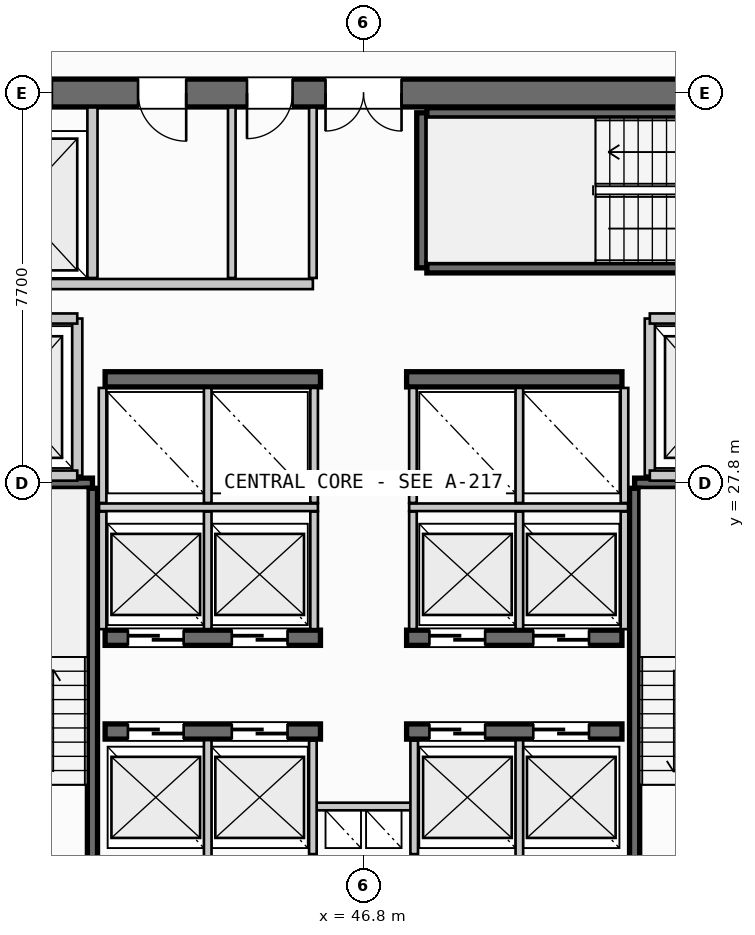
"""IFC4 building model, lengths in metres.
Left out: names, types, materials, properties, quantities, classifications, styles, units other than length and angle.
Written with IfcOpenShell. Run it as: python <this file> out.ifc"""

import sys

from ifc_helpers import new_model, si_unit, direction, frame, frame_2d, origin, place, context, subcontext, project, spatial, rectangle, extrude, source, transform, mapped, element, fill, save


model = new_model("IFC4")
c1 = context("Model", 3, precision=1e-05, world=origin(), true_north=direction((0.0, 1.0)))
c2 = subcontext(c1, "Body", "Model", "MODEL_VIEW")
j1 = project(units=[si_unit("LENGTHUNIT", "METRE"), si_unit("PLANEANGLEUNIT", "RADIAN")], contexts=[c1])
p1 = place(None, origin())
s1 = spatial("IfcSite", under=j1, at=p1, CompositionType="ELEMENT")
p2 = place(p1, origin())
s2 = spatial("IfcBuilding", under=s1, at=p2, CompositionType="ELEMENT")
p3 = place(p2, frame((0.0, 0.0, 125.2)))
s3 = spatial("IfcBuildingStorey", under=s2, at=p3, CompositionType="ELEMENT", Elevation=125.2)
p4 = place(p3, frame((55.6, 35.5, 0.0), z_axis=(0.0, 0.0, 1.0), x_axis=(-1.0, 0.0, 0.0)))
e1 = element("IfcWall", 1, at=p4, inside=s3, PredefinedType="SHEAR", context=c2, shape_type="SweptSolid", body=[
    extrude(rectangle(XDim=17.6, YDim=0.55, at=frame_2d((8.8, 0.0))), origin(), (0.0, 0.0, 1.0), 3.35),
])
p5 = place(p4, frame((8.05, 0.0, 0.0)))
e2 = element("IfcOpeningElement", 2, at=p5, cuts=e1, PredefinedType="OPENING", context=c2, shape_type="SweptSolid", body=[
    extrude(rectangle(XDim=1.5, YDim=2.2, at=frame_2d((0.75, 1.1))), frame((0.0, 0.285, 0.0), z_axis=(0.0, -1.0, 0.0), x_axis=(1.0, 0.0, 0.0)), (0.0, 0.0, 1.0), 0.57),
])
p6 = place(p4, frame((14.95, 0.0, 0.0)))
e3 = element("IfcOpeningElement", 3, at=p6, cuts=e1, PredefinedType="OPENING", context=c2, shape_type="SweptSolid", body=[
    extrude(rectangle(XDim=1.4, YDim=2.3, at=frame_2d((0.7, 1.15))), frame((0.0, 0.285, 0.0), z_axis=(0.0, -1.0, 0.0), x_axis=(1.0, 0.0, 0.0)), (0.0, 0.0, 1.0), 0.57),
])
p7 = place(p4, frame((12.3, 0.0, 0.0)))
e4 = element("IfcOpeningElement", 4, at=p7, cuts=e1, PredefinedType="OPENING", context=c2, shape_type="SweptSolid", body=[
    extrude(rectangle(XDim=0.95, YDim=2.15, at=frame_2d((0.475, 1.075))), frame((0.0, 0.285, 0.0), z_axis=(0.0, -1.0, 0.0), x_axis=(1.0, 0.0, 0.0)), (0.0, 0.0, 1.0), 0.57),
])
p8 = place(p4, frame((10.2, 0.0, 0.0)))
e5 = element("IfcOpeningElement", 5, at=p8, cuts=e1, PredefinedType="OPENING", context=c2, shape_type="SweptSolid", body=[
    extrude(rectangle(XDim=0.9, YDim=2.15, at=frame_2d((0.45, 1.075))), frame((0.0, 0.285, 0.0), z_axis=(0.0, -1.0, 0.0), x_axis=(1.0, 0.0, 0.0)), (0.0, 0.0, 1.0), 0.57),
])
p9 = place(p3, frame((41.7, 22.9, 0.0), z_axis=(0.0, 0.0, 1.0), x_axis=(1.0, 0.0, 0.0)))
e6 = element("IfcWall", 6, at=p9, inside=s3, PredefinedType="SHEAR", context=c2, shape_type="SweptSolid", body=[
    extrude(rectangle(XDim=4.25, YDim=0.3, at=frame_2d((2.125, 0.0))), origin(), (0.0, 0.0, 1.0), 3.35),
])
p10 = place(p9, frame((0.45, 0.0, 0.0)))
e7 = element("IfcOpeningElement", 7, at=p10, cuts=e6, PredefinedType="OPENING", context=c2, shape_type="SweptSolid", body=[
    extrude(rectangle(XDim=1.1, YDim=2.2, at=frame_2d((0.55, 1.1))), frame((0.0, 0.16, 0.0), z_axis=(0.0, -1.0, 0.0), x_axis=(1.0, 0.0, 0.0)), (0.0, 0.0, 1.0), 0.32),
])
p11 = place(p9, frame((2.5, 0.0, 0.0)))
e8 = element("IfcOpeningElement", 8, at=p11, cuts=e6, PredefinedType="OPENING", context=c2, shape_type="SweptSolid", body=[
    extrude(rectangle(XDim=1.1, YDim=2.2, at=frame_2d((0.55, 1.1))), frame((0.0, 0.16, 0.0), z_axis=(0.0, -1.0, 0.0), x_axis=(1.0, 0.0, 0.0)), (0.0, 0.0, 1.0), 0.32),
])
p12 = place(p3, frame((47.65, 22.9, 0.0), z_axis=(0.0, 0.0, 1.0), x_axis=(1.0, 0.0, 0.0)))
e9 = element("IfcWall", 9, at=p12, inside=s3, PredefinedType="SHEAR", context=c2, shape_type="SweptSolid", body=[
    extrude(rectangle(XDim=4.25, YDim=0.3, at=frame_2d((2.125, 0.0))), origin(), (0.0, 0.0, 1.0), 3.35),
])
p13 = place(p12, frame((0.45, 0.0, 0.0)))
e10 = element("IfcOpeningElement", 10, at=p13, cuts=e9, PredefinedType="OPENING", context=c2, shape_type="SweptSolid", body=[
    extrude(rectangle(XDim=1.1, YDim=2.2, at=frame_2d((0.55, 1.1))), frame((0.0, 0.16, 0.0), z_axis=(0.0, -1.0, 0.0), x_axis=(1.0, 0.0, 0.0)), (0.0, 0.0, 1.0), 0.32),
])
p14 = place(p12, frame((2.5, 0.0, 0.0)))
e11 = element("IfcOpeningElement", 11, at=p14, cuts=e9, PredefinedType="OPENING", context=c2, shape_type="SweptSolid", body=[
    extrude(rectangle(XDim=1.1, YDim=2.2, at=frame_2d((0.55, 1.1))), frame((0.0, 0.16, 0.0), z_axis=(0.0, -1.0, 0.0), x_axis=(1.0, 0.0, 0.0)), (0.0, 0.0, 1.0), 0.32),
])
p15 = place(p3, frame((41.7, 24.75, 0.0), z_axis=(0.0, 0.0, 1.0), x_axis=(1.0, 0.0, 0.0)))
e12 = element("IfcWall", 12, at=p15, inside=s3, PredefinedType="SHEAR", context=c2, shape_type="SweptSolid", body=[
    extrude(rectangle(XDim=4.25, YDim=0.3, at=frame_2d((2.125, 0.0))), origin(), (0.0, 0.0, 1.0), 3.35),
])
p16 = place(p15, frame((0.45, 0.0, 0.0)))
e13 = element("IfcOpeningElement", 13, at=p16, cuts=e12, PredefinedType="OPENING", context=c2, shape_type="SweptSolid", body=[
    extrude(rectangle(XDim=1.1, YDim=2.2, at=frame_2d((0.55, 1.1))), frame((0.0, 0.16, 0.0), z_axis=(0.0, -1.0, 0.0), x_axis=(1.0, 0.0, 0.0)), (0.0, 0.0, 1.0), 0.32),
])
p17 = place(p15, frame((2.5, 0.0, 0.0)))
e14 = element("IfcOpeningElement", 14, at=p17, cuts=e12, PredefinedType="OPENING", context=c2, shape_type="SweptSolid", body=[
    extrude(rectangle(XDim=1.1, YDim=2.2, at=frame_2d((0.55, 1.1))), frame((0.0, 0.16, 0.0), z_axis=(0.0, -1.0, 0.0), x_axis=(1.0, 0.0, 0.0)), (0.0, 0.0, 1.0), 0.32),
])
p18 = place(p3, frame((47.65, 24.75, 0.0), z_axis=(0.0, 0.0, 1.0), x_axis=(1.0, 0.0, 0.0)))
e15 = element("IfcWall", 15, at=p18, inside=s3, PredefinedType="SHEAR", context=c2, shape_type="SweptSolid", body=[
    extrude(rectangle(XDim=4.25, YDim=0.3, at=frame_2d((2.125, 0.0))), origin(), (0.0, 0.0, 1.0), 3.35),
])
p19 = place(p18, frame((0.45, 0.0, 0.0)))
e16 = element("IfcOpeningElement", 16, at=p19, cuts=e15, PredefinedType="OPENING", context=c2, shape_type="SweptSolid", body=[
    extrude(rectangle(XDim=1.1, YDim=2.2, at=frame_2d((0.55, 1.1))), frame((0.0, 0.16, 0.0), z_axis=(0.0, -1.0, 0.0), x_axis=(1.0, 0.0, 0.0)), (0.0, 0.0, 1.0), 0.32),
])
p20 = place(p18, frame((2.5, 0.0, 0.0)))
e17 = element("IfcOpeningElement", 17, at=p20, cuts=e15, PredefinedType="OPENING", context=c2, shape_type="SweptSolid", body=[
    extrude(rectangle(XDim=1.1, YDim=2.2, at=frame_2d((0.55, 1.1))), frame((0.0, 0.16, 0.0), z_axis=(0.0, -1.0, 0.0), x_axis=(1.0, 0.0, 0.0)), (0.0, 0.0, 1.0), 0.32),
])
for number, where, z_axis, x_axis in (
    (18, (41.7, 29.85, 0.0), (0.0, 0.0, 1.0), (1.0, 0.0, 0.0)),
    (19, (47.65, 29.85, 0.0), (0.0, 0.0, 1.0), (1.0, 0.0, 0.0)),
):
    element("IfcWall", number, at=place(p3, frame(where, z_axis=z_axis, x_axis=x_axis)), inside=s3, PredefinedType="SHEAR", context=c2, shape_type="SweptSolid", body=[
        extrude(rectangle(XDim=4.25, YDim=0.3, at=frame_2d((2.125, 0.0))), origin(), (0.0, 0.0, 1.0), 3.35),
    ])
p21 = place(p3, frame((38.39, 27.8, 0.0), z_axis=(0.0, 0.0, 1.0), x_axis=(1.0, 0.0, 0.0)))
e20 = element("IfcWall", 20, at=p21, inside=s3, PredefinedType="SHEAR", context=c2, shape_type="SweptSolid", body=[
    extrude(rectangle(XDim=3.06, YDim=0.2, at=frame_2d((1.53, 0.0))), origin(), (0.0, 0.0, 1.0), 3.35),
])
p22 = place(p3, frame((41.45, 27.7, 0.0), z_axis=(0.0, 0.0, 1.0), x_axis=(0.0, -1.0, 0.0)))
e21 = element("IfcWall", 21, at=p22, inside=s3, PredefinedType="SHEAR", context=c2, shape_type="SweptSolid", body=[
    extrude(rectangle(XDim=7.35, YDim=0.2, at=frame_2d((3.675, 0.0))), origin(), (0.0, 0.0, 1.0), 3.35),
])
p23 = place(p3, frame((52.15, 27.8, 0.0), z_axis=(0.0, 0.0, 1.0), x_axis=(1.0, 0.0, 0.0)))
e22 = element("IfcWall", 22, at=p23, inside=s3, PredefinedType="SHEAR", context=c2, shape_type="SweptSolid", body=[
    extrude(rectangle(XDim=3.06, YDim=0.2, at=frame_2d((1.53, 0.0))), origin(), (0.0, 0.0, 1.0), 3.35),
])
p24 = place(p3, frame((52.15, 20.35, 0.0), z_axis=(0.0, 0.0, 1.0), x_axis=(0.0, 1.0, 0.0)))
e23 = element("IfcWall", 23, at=p24, inside=s3, PredefinedType="SHEAR", context=c2, shape_type="SweptSolid", body=[
    extrude(rectangle(XDim=7.35, YDim=0.2, at=frame_2d((3.675, 0.0))), origin(), (0.0, 0.0, 1.0), 3.35),
])
p25 = place(p3, frame((47.95, 32.05, 0.0), z_axis=(0.0, 0.0, 1.0), x_axis=(0.0, 1.0, 0.0)))
e24 = element("IfcWall", 24, at=p25, inside=s3, PredefinedType="SHEAR", context=c2, shape_type="SweptSolid", body=[
    extrude(rectangle(XDim=3.06, YDim=0.2, at=frame_2d((1.53, 0.0))), origin(), (0.0, 0.0, 1.0), 3.35),
])
for number, where, z_axis, x_axis in (
    (25, (48.05, 35.11, 0.0), (0.0, 0.0, 1.0), (1.0, 0.0, 0.0)),
    (26, (55.4, 32.05, 0.0), (0.0, 0.0, 1.0), (-1.0, 0.0, 0.0)),
):
    element("IfcWall", number, at=place(p3, frame(where, z_axis=z_axis, x_axis=x_axis)), inside=s3, PredefinedType="SHEAR", context=c2, shape_type="SweptSolid", body=[
        extrude(rectangle(XDim=7.35, YDim=0.2, at=frame_2d((3.675, 0.0))), origin(), (0.0, 0.0, 1.0), 3.35),
    ])
p26 = place(p3, frame((45.8, 21.42, 0.0), z_axis=(0.0, 0.0, 1.0), x_axis=(1.0, 0.0, 0.0)))
e27 = element("IfcWall", 27, at=p26, inside=s3, PredefinedType="PARTITIONING", context=c2, shape_type="SweptSolid", body=[
    extrude(rectangle(XDim=2.0, YDim=0.15, at=frame_2d((1.0, 0.0))), origin(), (0.0, 0.0, 1.0), 2.635),
])
for number, where, z_axis, x_axis in (
    (28, (45.8, 20.48, 0.0), (0.0, 0.0, 1.0), (0.0, 1.0, 0.0)),
    (29, (47.8, 20.48, 0.0), (0.0, 0.0, 1.0), (0.0, 1.0, 0.0)),
):
    element("IfcWall", number, at=place(p3, frame(where, z_axis=z_axis, x_axis=x_axis)), inside=s3, PredefinedType="PARTITIONING", context=c2, shape_type="SweptSolid", body=[
        extrude(rectangle(XDim=2.24, YDim=0.15, at=frame_2d((1.12, 0.0))), origin(), (0.0, 0.0, 1.0), 2.635),
    ])
p27 = place(p3, frame((41.15, 27.95, 0.0), z_axis=(0.0, 0.0, 1.0), x_axis=(0.0, 1.0, 0.0)))
e30 = element("IfcWall", 30, at=p27, inside=s3, PredefinedType="PARTITIONING", context=c2, shape_type="SweptSolid", body=[
    extrude(rectangle(XDim=3.1, YDim=0.2, at=frame_2d((1.55, 0.0))), origin(), (0.0, 0.0, 1.0), 2.635),
])
for number, where, z_axis, x_axis in (
    (31, (38.285, 27.95, 0.0), (0.0, 0.0, 1.0), (1.0, 0.0, 0.0)),
    (32, (38.285, 31.05, 0.0), (0.0, 0.0, 1.0), (1.0, 0.0, 0.0)),
):
    element("IfcWall", number, at=place(p3, frame(where, z_axis=z_axis, x_axis=x_axis)), inside=s3, PredefinedType="PARTITIONING", context=c2, shape_type="SweptSolid", body=[
        extrude(rectangle(XDim=2.865, YDim=0.2, at=frame_2d((1.433, 0.0))), origin(), (0.0, 0.0, 1.0), 2.635),
    ])
p28 = place(p3, frame((52.45, 27.95, 0.0), z_axis=(0.0, 0.0, 1.0), x_axis=(0.0, 1.0, 0.0)))
e33 = element("IfcWall", 33, at=p28, inside=s3, PredefinedType="PARTITIONING", context=c2, shape_type="SweptSolid", body=[
    extrude(rectangle(XDim=3.1, YDim=0.2, at=frame_2d((1.55, 0.0))), origin(), (0.0, 0.0, 1.0), 2.635),
])
for number, where, z_axis, x_axis in (
    (34, (52.45, 27.95, 0.0), (0.0, 0.0, 1.0), (1.0, 0.0, 0.0)),
    (35, (52.45, 31.05, 0.0), (0.0, 0.0, 1.0), (1.0, 0.0, 0.0)),
):
    element("IfcWall", number, at=place(p3, frame(where, z_axis=z_axis, x_axis=x_axis)), inside=s3, PredefinedType="PARTITIONING", context=c2, shape_type="SweptSolid", body=[
        extrude(rectangle(XDim=2.865, YDim=0.2, at=frame_2d((1.433, 0.0))), origin(), (0.0, 0.0, 1.0), 2.635),
    ])
for number, where, z_axis, x_axis in (
    (36, (43.725, 20.385, 0.0), (0.0, 0.0, 1.0), (0.0, 1.0, 0.0)),
    (37, (49.875, 20.385, 0.0), (0.0, 0.0, 1.0), (0.0, 1.0, 0.0)),
):
    element("IfcWall", number, at=place(p3, frame(where, z_axis=z_axis, x_axis=x_axis)), inside=s3, PredefinedType="PARTITIONING", context=c2, shape_type="SweptSolid", body=[
        extrude(rectangle(XDim=2.345, YDim=0.15, at=frame_2d((1.172, 0.0))), origin(), (0.0, 0.0, 1.0), 2.635),
    ])
p29 = place(p3, frame((41.58, 27.325, 0.0), z_axis=(0.0, 0.0, 1.0), x_axis=(1.0, 0.0, 0.0)))
e38 = element("IfcWall", 38, at=p29, inside=s3, PredefinedType="PARTITIONING", context=c2, shape_type="SweptSolid", body=[
    extrude(rectangle(XDim=4.32, YDim=0.15, at=frame_2d((2.16, 0.0))), origin(), (0.0, 0.0, 1.0), 2.635),
])
p30 = place(p3, frame((47.7, 27.325, 0.0), z_axis=(0.0, 0.0, 1.0), x_axis=(1.0, 0.0, 0.0)))
e39 = element("IfcWall", 39, at=p30, inside=s3, PredefinedType="PARTITIONING", context=c2, shape_type="SweptSolid", body=[
    extrude(rectangle(XDim=4.32, YDim=0.15, at=frame_2d((2.16, 0.0))), origin(), (0.0, 0.0, 1.0), 2.635),
])
for number, where, z_axis, x_axis in (
    (40, (41.65, 24.92, 0.0), (0.0, 0.0, 1.0), (0.0, 1.0, 0.0)),
    (41, (43.725, 24.92, 0.0), (0.0, 0.0, 1.0), (0.0, 1.0, 0.0)),
    (42, (45.825, 24.92, 0.0), (0.0, 0.0, 1.0), (0.0, 1.0, 0.0)),
    (43, (47.775, 24.92, 0.0), (0.0, 0.0, 1.0), (0.0, 1.0, 0.0)),
    (44, (49.875, 24.92, 0.0), (0.0, 0.0, 1.0), (0.0, 1.0, 0.0)),
    (45, (51.95, 24.92, 0.0), (0.0, 0.0, 1.0), (0.0, 1.0, 0.0)),
):
    element("IfcWall", number, at=place(p3, frame(where, z_axis=z_axis, x_axis=x_axis)), inside=s3, PredefinedType="PARTITIONING", context=c2, shape_type="SweptSolid", body=[
        extrude(rectangle(XDim=2.32, YDim=0.15, at=frame_2d((1.16, 0.0))), origin(), (0.0, 0.0, 1.0), 2.635),
    ])
for number, where, z_axis, x_axis in (
    (46, (41.65, 27.41, 0.0), (0.0, 0.0, 1.0), (0.0, 1.0, 0.0)),
    (47, (43.725, 27.41, 0.0), (0.0, 0.0, 1.0), (0.0, 1.0, 0.0)),
    (48, (45.825, 27.41, 0.0), (0.0, 0.0, 1.0), (0.0, 1.0, 0.0)),
    (49, (47.775, 27.41, 0.0), (0.0, 0.0, 1.0), (0.0, 1.0, 0.0)),
    (50, (49.875, 27.41, 0.0), (0.0, 0.0, 1.0), (0.0, 1.0, 0.0)),
    (51, (51.95, 27.41, 0.0), (0.0, 0.0, 1.0), (0.0, 1.0, 0.0)),
):
    element("IfcWall", number, at=place(p3, frame(where, z_axis=z_axis, x_axis=x_axis)), inside=s3, PredefinedType="PARTITIONING", context=c2, shape_type="SweptSolid", body=[
        extrude(rectangle(XDim=2.27, YDim=0.15, at=frame_2d((1.135, 0.0))), origin(), (0.0, 0.0, 1.0), 2.635),
    ])
p31 = place(p3, frame((41.45, 31.85, 0.0), z_axis=(0.0, 0.0, 1.0), x_axis=(0.0, 1.0, 0.0)))
e52 = element("IfcWall", 52, at=p31, inside=s3, PredefinedType="PARTITIONING", context=c2, shape_type="SweptSolid", body=[
    extrude(rectangle(XDim=3.365, YDim=0.2, at=frame_2d((1.683, 0.0))), origin(), (0.0, 0.0, 1.0), 2.635),
])
p32 = place(p3, frame((38.285, 31.73, 0.0), z_axis=(0.0, 0.0, 1.0), x_axis=(1.0, 0.0, 0.0)))
e53 = element("IfcWall", 53, at=p32, inside=s3, PredefinedType="PARTITIONING", context=c2, shape_type="SweptSolid", body=[
    extrude(rectangle(XDim=7.515, YDim=0.2, at=frame_2d((3.758, 0.0))), origin(), (0.0, 0.0, 1.0), 2.635),
])
p33 = place(p3, frame((45.8, 31.85, 0.0), z_axis=(0.0, 0.0, 1.0), x_axis=(0.0, 1.0, 0.0)))
e54 = element("IfcWall", 54, at=p33, inside=s3, PredefinedType="PARTITIONING", context=c2, shape_type="SweptSolid", body=[
    extrude(rectangle(XDim=3.365, YDim=0.15, at=frame_2d((1.683, 0.0))), origin(), (0.0, 0.0, 1.0), 2.635),
])
p34 = place(p3, frame((44.2, 31.85, 0.0), z_axis=(0.0, 0.0, 1.0), x_axis=(0.0, 1.0, 0.0)))
e55 = element("IfcWall", 55, at=p34, inside=s3, PredefinedType="PLUMBINGWALL", context=c2, shape_type="SweptSolid", body=[
    extrude(rectangle(XDim=3.365, YDim=0.15, at=frame_2d((1.683, 0.0))), origin(), (0.0, 0.0, 1.0), 2.635),
])
m1 = source(origin(), c2, "Body", "SweptSolid", [
    extrude(rectangle(XDim=1.5, YDim=2.2, at=frame_2d((0.75, 1.1))), frame((0.0, 0.025, 0.0), z_axis=(0.0, -1.0, 0.0), x_axis=(1.0, 0.0, 0.0)), (0.0, 0.0, 1.0), 0.05),
])
p35 = place(p5, origin())
e56 = element("IfcDoor", 56, at=p35, inside=s3, OperationType="DOUBLE_DOOR_SINGLE_SWING", PredefinedType="DOOR", context=c2, shape_type="MappedRepresentation", body=[
    mapped(m1, transform((0.0, 0.0, 0.0), scale=1.0)),
])
fill(e2, e56)
m2 = source(origin(), c2, "Body", "SweptSolid", [
    extrude(rectangle(XDim=1.1, YDim=2.2, at=frame_2d((0.55, 1.1))), frame((0.0, 0.025, 0.0), z_axis=(0.0, -1.0, 0.0), x_axis=(1.0, 0.0, 0.0)), (0.0, 0.0, 1.0), 0.05),
])
p36 = place(p10, origin())
e57 = element("IfcDoor", 57, at=p36, inside=s3, OperationType="SLIDING_TO_LEFT", PredefinedType="DOOR", context=c2, shape_type="MappedRepresentation", body=[
    mapped(m2, transform((0.0, 0.0, 0.0), scale=1.0)),
])
fill(e7, e57)
p37 = place(p11, origin())
e58 = element("IfcDoor", 58, at=p37, inside=s3, OperationType="SLIDING_TO_LEFT", PredefinedType="DOOR", context=c2, shape_type="MappedRepresentation", body=[
    mapped(m2, transform((0.0, 0.0, 0.0), scale=1.0)),
])
fill(e8, e58)
p38 = place(p13, origin())
e59 = element("IfcDoor", 59, at=p38, inside=s3, OperationType="SLIDING_TO_LEFT", PredefinedType="DOOR", context=c2, shape_type="MappedRepresentation", body=[
    mapped(m2, transform((0.0, 0.0, 0.0), scale=1.0)),
])
fill(e10, e59)
p39 = place(p14, origin())
e60 = element("IfcDoor", 60, at=p39, inside=s3, OperationType="SLIDING_TO_LEFT", PredefinedType="DOOR", context=c2, shape_type="MappedRepresentation", body=[
    mapped(m2, transform((0.0, 0.0, 0.0), scale=1.0)),
])
fill(e11, e60)
p40 = place(p16, origin())
e61 = element("IfcDoor", 61, at=p40, inside=s3, OperationType="SLIDING_TO_RIGHT", PredefinedType="DOOR", context=c2, shape_type="MappedRepresentation", body=[
    mapped(m2, transform((0.0, 0.0, 0.0), scale=1.0)),
])
fill(e13, e61)
p41 = place(p17, origin())
e62 = element("IfcDoor", 62, at=p41, inside=s3, OperationType="SLIDING_TO_RIGHT", PredefinedType="DOOR", context=c2, shape_type="MappedRepresentation", body=[
    mapped(m2, transform((0.0, 0.0, 0.0), scale=1.0)),
])
fill(e14, e62)
p42 = place(p19, origin())
e63 = element("IfcDoor", 63, at=p42, inside=s3, OperationType="SLIDING_TO_RIGHT", PredefinedType="DOOR", context=c2, shape_type="MappedRepresentation", body=[
    mapped(m2, transform((0.0, 0.0, 0.0), scale=1.0)),
])
fill(e16, e63)
p43 = place(p20, origin())
e64 = element("IfcDoor", 64, at=p43, inside=s3, OperationType="SLIDING_TO_RIGHT", PredefinedType="DOOR", context=c2, shape_type="MappedRepresentation", body=[
    mapped(m2, transform((0.0, 0.0, 0.0), scale=1.0)),
])
fill(e17, e64)
m3 = source(origin(), c2, "Body", "SweptSolid", [
    extrude(rectangle(XDim=1.4, YDim=2.3, at=frame_2d((0.7, 1.15))), frame((0.0, 0.025, 0.0), z_axis=(0.0, -1.0, 0.0), x_axis=(1.0, 0.0, 0.0)), (0.0, 0.0, 1.0), 0.05),
])
p44 = place(p6, origin())
e65 = element("IfcDoor", 65, at=p44, inside=s3, OperationType="SLIDING_TO_RIGHT", PredefinedType="DOOR", context=c2, shape_type="MappedRepresentation", body=[
    mapped(m3, transform((0.0, 0.0, 0.0), scale=1.0)),
])
fill(e3, e65)
m4 = source(origin(), c2, "Body", "SweptSolid", [
    extrude(rectangle(XDim=0.95, YDim=2.15, at=frame_2d((0.475, 1.075))), frame((0.0, 0.025, 0.0), z_axis=(0.0, -1.0, 0.0), x_axis=(1.0, 0.0, 0.0)), (0.0, 0.0, 1.0), 0.05),
])
p45 = place(p7, origin())
e66 = element("IfcDoor", 66, at=p45, inside=s3, OperationType="SINGLE_SWING_LEFT", PredefinedType="DOOR", context=c2, shape_type="MappedRepresentation", body=[
    mapped(m4, transform((0.0, 0.0, 0.0), scale=1.0)),
])
fill(e4, e66)
m5 = source(origin(), c2, "Body", "SweptSolid", [
    extrude(rectangle(XDim=0.9, YDim=2.15, at=frame_2d((0.45, 1.075))), frame((0.0, 0.025, 0.0), z_axis=(0.0, -1.0, 0.0), x_axis=(1.0, 0.0, 0.0)), (0.0, 0.0, 1.0), 0.05),
])
p46 = place(p8, origin())
e67 = element("IfcDoor", 67, at=p46, inside=s3, OperationType="SINGLE_SWING_RIGHT", PredefinedType="DOOR", context=c2, shape_type="MappedRepresentation", body=[
    mapped(m5, transform((0.0, 0.0, 0.0), scale=1.0)),
])
fill(e5, e67)
save(model, sys.argv[1])
